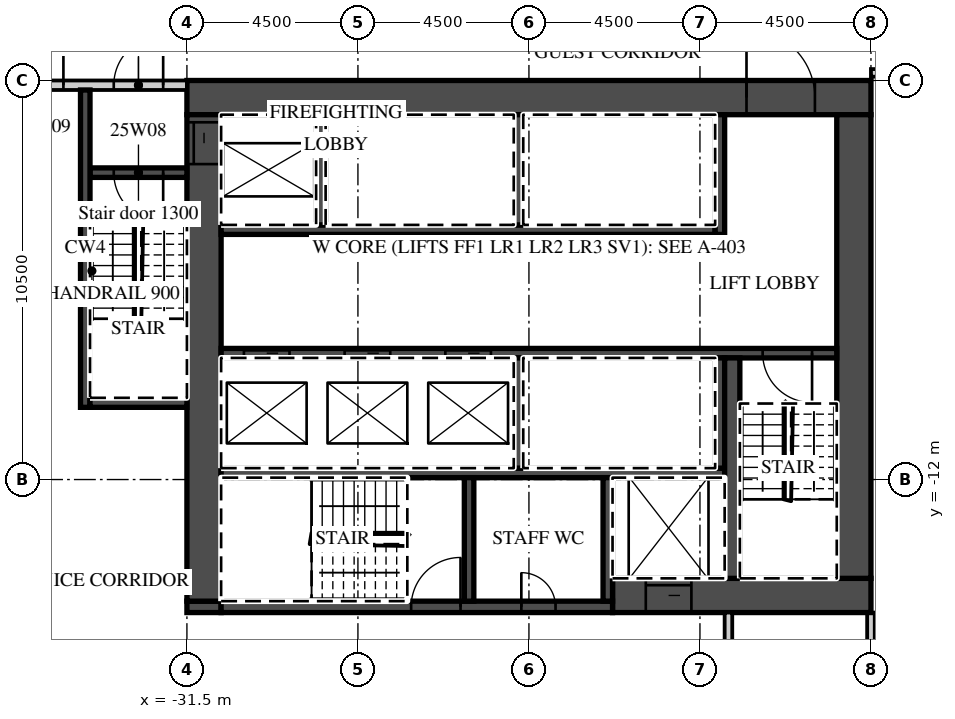
"""IFC4 building model, lengths in metres.
Left out: names, types, materials, properties, quantities, classifications, styles, units other than length and angle.
Written with IfcOpenShell. Run it as: python <this file> out.ifc"""

import sys

from ifc_helpers import new_model, si_unit, direction, frame, frame_2d, origin, place, context, subcontext, project, spatial, rectangle, extrude, element, fill, save


model = new_model("IFC4")
c1 = context("Model", 3, precision=1e-05, world=origin(), true_north=direction((0.0, 1.0)))
c2 = subcontext(c1, "Body", "Model", "MODEL_VIEW")
j1 = project(units=[si_unit("LENGTHUNIT", "METRE"), si_unit("PLANEANGLEUNIT", "RADIAN")], contexts=[c1])
p1 = place(None, origin())
s1 = spatial("IfcSite", under=j1, at=p1, CompositionType="ELEMENT")
p2 = place(p1, origin())
s2 = spatial("IfcBuilding", under=s1, at=p2, CompositionType="ELEMENT")
p3 = place(p2, frame((0.0, 0.0, 117.4)))
s3 = spatial("IfcBuildingStorey", under=s2, at=p3, CompositionType="ELEMENT", Elevation=117.4)
p4 = place(p3, frame((-13.5, -22.232, 0.0), z_axis=(0.0, 0.0, 1.0), x_axis=(0.0, 1.0, 0.0)))
e1 = element("IfcWall", 1, at=p4, inside=s3, PredefinedType="PARTITIONING", context=c2, shape_type="SweptSolid", body=[
    extrude(rectangle(XDim=6.732, YDim=0.2, at=frame_2d((3.366, 0.0))), origin(), (0.0, 0.0, 1.0), 3.02),
])
p5 = place(p3, frame((-13.5, -1.3, 0.0), z_axis=(0.0, 0.0, 1.0), x_axis=(1.0, 0.0, 0.0)))
e2 = element("IfcWall", 2, at=p5, inside=s3, PredefinedType="PARTITIONING", context=c2, shape_type="SweptSolid", body=[
    extrude(rectangle(XDim=60.932, YDim=0.2, at=frame_2d((30.466, 0.0))), origin(), (0.0, 0.0, 1.0), 3.02),
])
p6 = place(p5, frame((0.575, 0.0, 0.0)))
e3 = element("IfcOpeningElement", 3, at=p6, cuts=e2, PredefinedType="OPENING", context=c2, shape_type="SweptSolid", body=[
    extrude(rectangle(XDim=1.0, YDim=2.1, at=frame_2d((0.5, 1.05))), frame((0.0, 0.11, 0.0), z_axis=(0.0, -1.0, 0.0), x_axis=(1.0, 0.0, 0.0)), (0.0, 0.0, 1.0), 0.22),
])
p7 = place(p5, frame((5.075, 0.0, 0.0)))
e4 = element("IfcOpeningElement", 4, at=p7, cuts=e2, PredefinedType="OPENING", context=c2, shape_type="SweptSolid", body=[
    extrude(rectangle(XDim=1.0, YDim=2.1, at=frame_2d((0.5, 1.05))), frame((0.0, 0.11, 0.0), z_axis=(0.0, -1.0, 0.0), x_axis=(1.0, 0.0, 0.0)), (0.0, 0.0, 1.0), 0.22),
])
p8 = place(p5, frame((11.925, 0.0, 0.0)))
e5 = element("IfcOpeningElement", 5, at=p8, cuts=e2, PredefinedType="OPENING", context=c2, shape_type="SweptSolid", body=[
    extrude(rectangle(XDim=1.0, YDim=2.1, at=frame_2d((0.5, 1.05))), frame((0.0, 0.11, 0.0), z_axis=(0.0, -1.0, 0.0), x_axis=(1.0, 0.0, 0.0)), (0.0, 0.0, 1.0), 0.22),
])
p9 = place(p5, frame((15.938, 0.0, 0.0)))
e6 = element("IfcOpeningElement", 6, at=p9, cuts=e2, PredefinedType="OPENING", context=c2, shape_type="SweptSolid", body=[
    extrude(rectangle(XDim=1.2, YDim=2.1, at=frame_2d((0.6, 1.05))), frame((0.0, 0.11, 0.0), z_axis=(0.0, -1.0, 0.0), x_axis=(1.0, 0.0, 0.0)), (0.0, 0.0, 1.0), 0.22),
])
p10 = place(p5, frame((25.45, 0.0, 0.0)))
e7 = element("IfcOpeningElement", 7, at=p10, cuts=e2, PredefinedType="OPENING", context=c2, shape_type="SweptSolid", body=[
    extrude(rectangle(XDim=1.0, YDim=2.1, at=frame_2d((0.5, 1.05))), frame((0.0, 0.11, 0.0), z_axis=(0.0, -1.0, 0.0), x_axis=(1.0, 0.0, 0.0)), (0.0, 0.0, 1.0), 0.22),
])
p11 = place(p5, frame((27.55, 0.0, 0.0)))
e8 = element("IfcOpeningElement", 8, at=p11, cuts=e2, PredefinedType="OPENING", context=c2, shape_type="SweptSolid", body=[
    extrude(rectangle(XDim=1.0, YDim=2.1, at=frame_2d((0.5, 1.05))), frame((0.0, 0.11, 0.0), z_axis=(0.0, -1.0, 0.0), x_axis=(1.0, 0.0, 0.0)), (0.0, 0.0, 1.0), 0.22),
])
p12 = place(p5, frame((33.938, 0.0, 0.0)))
e9 = element("IfcOpeningElement", 9, at=p12, cuts=e2, PredefinedType="OPENING", context=c2, shape_type="SweptSolid", body=[
    extrude(rectangle(XDim=1.2, YDim=2.1, at=frame_2d((0.6, 1.05))), frame((0.0, 0.11, 0.0), z_axis=(0.0, -1.0, 0.0), x_axis=(1.0, 0.0, 0.0)), (0.0, 0.0, 1.0), 0.22),
])
p13 = place(p5, frame((45.862, 0.0, 0.0)))
e10 = element("IfcOpeningElement", 10, at=p13, cuts=e2, PredefinedType="OPENING", context=c2, shape_type="SweptSolid", body=[
    extrude(rectangle(XDim=1.2, YDim=2.1, at=frame_2d((0.6, 1.05))), frame((0.0, 0.11, 0.0), z_axis=(0.0, -1.0, 0.0), x_axis=(1.0, 0.0, 0.0)), (0.0, 0.0, 1.0), 0.22),
])
p14 = place(p5, frame((52.425, 0.0, 0.0)))
e11 = element("IfcOpeningElement", 11, at=p14, cuts=e2, PredefinedType="OPENING", context=c2, shape_type="SweptSolid", body=[
    extrude(rectangle(XDim=1.0, YDim=2.1, at=frame_2d((0.5, 1.05))), frame((0.0, 0.11, 0.0), z_axis=(0.0, -1.0, 0.0), x_axis=(1.0, 0.0, 0.0)), (0.0, 0.0, 1.0), 0.22),
])
p15 = place(p5, frame((56.95, 0.0, 0.0)))
e12 = element("IfcOpeningElement", 12, at=p15, cuts=e2, PredefinedType="OPENING", context=c2, shape_type="SweptSolid", body=[
    extrude(rectangle(XDim=1.0, YDim=2.1, at=frame_2d((0.5, 1.05))), frame((0.0, 0.11, 0.0), z_axis=(0.0, -1.0, 0.0), x_axis=(1.0, 0.0, 0.0)), (0.0, 0.0, 1.0), 0.22),
])
p16 = place(p5, frame((59.882, 0.0, 0.0)))
e13 = element("IfcOpeningElement", 13, at=p16, cuts=e2, PredefinedType="OPENING", context=c2, shape_type="SweptSolid", body=[
    extrude(rectangle(XDim=0.9, YDim=2.1, at=frame_2d((0.45, 1.05))), frame((0.0, 0.11, 0.0), z_axis=(0.0, -1.0, 0.0), x_axis=(1.0, 0.0, 0.0)), (0.0, 0.0, 1.0), 0.22),
])
p17 = place(p3, frame((-31.5, -1.95, 0.0), z_axis=(0.0, 0.0, 1.0), x_axis=(1.0, 0.0, 0.0)))
e14 = element("IfcWall", 14, at=p17, inside=s3, PredefinedType="SHEAR", context=c2, shape_type="SweptSolid", body=[
    extrude(rectangle(XDim=18.0, YDim=0.9, at=frame_2d((9.0, 0.0))), origin(), (0.0, 0.0, 1.0), 3.02),
])
p18 = place(p17, frame((14.725, 0.0, 0.0)))
e15 = element("IfcOpeningElement", 15, at=p18, cuts=e14, PredefinedType="OPENING", context=c2, shape_type="SweptSolid", body=[
    extrude(rectangle(XDim=1.8, YDim=2.1, at=frame_2d((0.9, 1.05))), frame((0.0, 0.46, 0.0), z_axis=(0.0, -1.0, 0.0), x_axis=(1.0, 0.0, 0.0)), (0.0, 0.0, 1.0), 0.92),
])
p19 = place(p3, frame((-20.3, -15.05, 0.0), z_axis=(0.0, 0.0, 1.0), x_axis=(1.0, 0.0, 0.0)))
e16 = element("IfcWall", 16, at=p19, inside=s3, PredefinedType="SHEAR", context=c2, shape_type="SweptSolid", body=[
    extrude(rectangle(XDim=6.8, YDim=0.9, at=frame_2d((3.4, 0.0))), origin(), (0.0, 0.0, 1.0), 3.02),
])
p20 = place(p19, frame((0.875, 0.0, 0.0)))
e17 = element("IfcOpeningElement", 17, at=p20, cuts=e16, PredefinedType="OPENING", context=c2, shape_type="SweptSolid", body=[
    extrude(rectangle(XDim=1.2, YDim=2.1, at=frame_2d((0.6, 1.05))), frame((0.0, 0.46, 0.0), z_axis=(0.0, -1.0, 0.0), x_axis=(1.0, 0.0, 0.0)), (0.0, 0.0, 1.0), 0.92),
])
p21 = place(p3, frame((-31.5, -15.35, 0.0), z_axis=(0.0, 0.0, 1.0), x_axis=(1.0, 0.0, 0.0)))
e18 = element("IfcWall", 18, at=p21, inside=s3, PredefinedType="SHEAR", context=c2, shape_type="SweptSolid", body=[
    extrude(rectangle(XDim=0.9, YDim=0.3, at=frame_2d((0.45, 0.0))), origin(), (0.0, 0.0, 1.0), 3.02),
])
p22 = place(p3, frame((-30.6, -15.35, 0.0), z_axis=(0.0, 0.0, 1.0), x_axis=(1.0, 0.0, 0.0)))
e19 = element("IfcWall", 19, at=p22, inside=s3, PredefinedType="SHEAR", context=c2, shape_type="SweptSolid", body=[
    extrude(rectangle(XDim=10.3, YDim=0.3, at=frame_2d((5.15, 0.0))), origin(), (0.0, 0.0, 1.0), 3.02),
])
p23 = place(p22, frame((5.0, 0.0, 0.0)))
e20 = element("IfcOpeningElement", 20, at=p23, cuts=e19, PredefinedType="OPENING", context=c2, shape_type="SweptSolid", body=[
    extrude(rectangle(XDim=1.3, YDim=2.1, at=frame_2d((0.65, 1.05))), frame((0.0, 0.16, 0.0), z_axis=(0.0, -1.0, 0.0), x_axis=(1.0, 0.0, 0.0)), (0.0, 0.0, 1.0), 0.32),
])
p24 = place(p22, frame((7.9, 0.0, 0.0)))
e21 = element("IfcOpeningElement", 21, at=p24, cuts=e19, PredefinedType="OPENING", context=c2, shape_type="SweptSolid", body=[
    extrude(rectangle(XDim=0.9, YDim=2.1, at=frame_2d((0.45, 1.05))), frame((0.0, 0.16, 0.0), z_axis=(0.0, -1.0, 0.0), x_axis=(1.0, 0.0, 0.0)), (0.0, 0.0, 1.0), 0.32),
])
p25 = place(p3, frame((-31.05, -15.2, 0.0), z_axis=(0.0, 0.0, 1.0), x_axis=(0.0, 1.0, 0.0)))
e22 = element("IfcWall", 22, at=p25, inside=s3, PredefinedType="SHEAR", context=c2, shape_type="SweptSolid", body=[
    extrude(rectangle(XDim=12.8, YDim=0.9, at=frame_2d((6.4, 0.0))), origin(), (0.0, 0.0, 1.0), 3.02),
])
p26 = place(p25, frame((11.5, 0.0, 0.0)))
e23 = element("IfcOpeningElement", 23, at=p26, cuts=e22, PredefinedType="OPENING", context=c2, shape_type="SweptSolid", body=[
    extrude(rectangle(XDim=1.1, YDim=2.1, at=frame_2d((0.55, 1.05))), frame((0.0, 0.46, 0.0), z_axis=(0.0, -1.0, 0.0), x_axis=(1.0, 0.0, 0.0)), (0.0, 0.0, 1.0), 0.92),
])
p27 = place(p3, frame((-13.95, -14.6, 0.0), z_axis=(0.0, 0.0, 1.0), x_axis=(0.0, 1.0, 0.0)))
e24 = element("IfcWall", 24, at=p27, inside=s3, PredefinedType="SHEAR", context=c2, shape_type="SweptSolid", body=[
    extrude(rectangle(XDim=12.2, YDim=0.9, at=frame_2d((6.1, 0.0))), origin(), (0.0, 0.0, 1.0), 3.02),
])
p28 = place(p3, frame((-30.6, -5.425, 0.0), z_axis=(0.0, 0.0, 1.0), x_axis=(1.0, 0.0, 0.0)))
e25 = element("IfcWall", 25, at=p28, inside=s3, PredefinedType="SHEAR", context=c2, shape_type="SweptSolid", body=[
    extrude(rectangle(XDim=13.0, YDim=0.25, at=frame_2d((6.5, 0.0))), origin(), (0.0, 0.0, 1.0), 3.02),
])
p29 = place(p3, frame((-17.475, -5.55, 0.0), z_axis=(0.0, 0.0, 1.0), x_axis=(0.0, 1.0, 0.0)))
e26 = element("IfcWall", 26, at=p29, inside=s3, PredefinedType="SHEAR", context=c2, shape_type="SweptSolid", body=[
    extrude(rectangle(XDim=3.15, YDim=0.25, at=frame_2d((1.575, 0.0))), origin(), (0.0, 0.0, 1.0), 3.02),
])
for number, where, z_axis, x_axis in (
    (27, (-27.975, -5.3, 0.0), (0.0, 0.0, 1.0), (0.0, 1.0, 0.0)),
    (28, (-22.775, -5.3, 0.0), (0.0, 0.0, 1.0), (0.0, 1.0, 0.0)),
):
    element("IfcWall", number, at=place(p3, frame(where, z_axis=z_axis, x_axis=x_axis)), inside=s3, PredefinedType="SHEAR", context=c2, shape_type="SweptSolid", body=[
        extrude(rectangle(XDim=2.9, YDim=0.25, at=frame_2d((1.45, 0.0))), origin(), (0.0, 0.0, 1.0), 3.02),
    ])
p30 = place(p3, frame((-30.6, -8.675, 0.0), z_axis=(0.0, 0.0, 1.0), x_axis=(1.0, 0.0, 0.0)))
e29 = element("IfcWall", 29, at=p30, inside=s3, PredefinedType="SHEAR", context=c2, shape_type="SweptSolid", body=[
    extrude(rectangle(XDim=16.2, YDim=0.25, at=frame_2d((8.1, 0.0))), origin(), (0.0, 0.0, 1.0), 3.02),
])
p31 = place(p30, frame((0.6, 0.0, 0.0)))
e30 = element("IfcOpeningElement", 30, at=p31, cuts=e29, PredefinedType="OPENING", context=c2, shape_type="SweptSolid", body=[
    extrude(rectangle(XDim=1.2, YDim=2.1, at=frame_2d((0.6, 1.05))), frame((0.0, 0.135, 0.0), z_axis=(0.0, -1.0, 0.0), x_axis=(1.0, 0.0, 0.0)), (0.0, 0.0, 1.0), 0.27),
])
p32 = place(p30, frame((3.25, 0.0, 0.0)))
e31 = element("IfcOpeningElement", 31, at=p32, cuts=e29, PredefinedType="OPENING", context=c2, shape_type="SweptSolid", body=[
    extrude(rectangle(XDim=1.2, YDim=2.1, at=frame_2d((0.6, 1.05))), frame((0.0, 0.135, 0.0), z_axis=(0.0, -1.0, 0.0), x_axis=(1.0, 0.0, 0.0)), (0.0, 0.0, 1.0), 0.27),
])
p33 = place(p30, frame((5.9, 0.0, 0.0)))
e32 = element("IfcOpeningElement", 32, at=p33, cuts=e29, PredefinedType="OPENING", context=c2, shape_type="SweptSolid", body=[
    extrude(rectangle(XDim=1.2, YDim=2.1, at=frame_2d((0.6, 1.05))), frame((0.0, 0.135, 0.0), z_axis=(0.0, -1.0, 0.0), x_axis=(1.0, 0.0, 0.0)), (0.0, 0.0, 1.0), 0.27),
])
p34 = place(p30, frame((14.25, 0.0, 0.0)))
e33 = element("IfcOpeningElement", 33, at=p34, cuts=e29, PredefinedType="OPENING", context=c2, shape_type="SweptSolid", body=[
    extrude(rectangle(XDim=1.3, YDim=2.1, at=frame_2d((0.65, 1.05))), frame((0.0, 0.135, 0.0), z_axis=(0.0, -1.0, 0.0), x_axis=(1.0, 0.0, 0.0)), (0.0, 0.0, 1.0), 0.27),
])
p35 = place(p3, frame((-30.6, -11.825, 0.0), z_axis=(0.0, 0.0, 1.0), x_axis=(1.0, 0.0, 0.0)))
e34 = element("IfcWall", 34, at=p35, inside=s3, PredefinedType="SHEAR", context=c2, shape_type="SweptSolid", body=[
    extrude(rectangle(XDim=13.25, YDim=0.25, at=frame_2d((6.625, 0.0))), origin(), (0.0, 0.0, 1.0), 3.02),
])
for number, where, z_axis, x_axis in (
    (35, (-17.475, -11.7, 0.0), (0.0, 0.0, 1.0), (0.0, 1.0, 0.0)),
    (36, (-22.775, -11.7, 0.0), (0.0, 0.0, 1.0), (0.0, 1.0, 0.0)),
):
    element("IfcWall", number, at=place(p3, frame(where, z_axis=z_axis, x_axis=x_axis)), inside=s3, PredefinedType="SHEAR", context=c2, shape_type="SweptSolid", body=[
        extrude(rectangle(XDim=2.9, YDim=0.25, at=frame_2d((1.45, 0.0))), origin(), (0.0, 0.0, 1.0), 3.02),
    ])
p36 = place(p3, frame((-17.15, -14.6, 0.0), z_axis=(0.0, 0.0, 1.0), x_axis=(0.0, 1.0, 0.0)))
e37 = element("IfcWall", 37, at=p36, inside=s3, PredefinedType="SHEAR", context=c2, shape_type="SweptSolid", body=[
    extrude(rectangle(XDim=5.8, YDim=0.4, at=frame_2d((2.9, 0.0))), origin(), (0.0, 0.0, 1.0), 3.02),
])
for number, where, z_axis, x_axis in (
    (38, (-20.425, -15.2, 0.0), (0.0, 0.0, 1.0), (0.0, 1.0, 0.0)),
    (39, (-24.075, -15.2, 0.0), (0.0, 0.0, 1.0), (0.0, 1.0, 0.0)),
):
    element("IfcWall", number, at=place(p3, frame(where, z_axis=z_axis, x_axis=x_axis)), inside=s3, PredefinedType="SHEAR", context=c2, shape_type="SweptSolid", body=[
        extrude(rectangle(XDim=3.25, YDim=0.25, at=frame_2d((1.625, 0.0))), origin(), (0.0, 0.0, 1.0), 3.02),
    ])
p37 = place(p3, frame((-39.035, -1.625, 0.0), z_axis=(0.0, 0.0, 1.0), x_axis=(1.0, 0.0, 0.0)))
e40 = element("IfcWall", 40, at=p37, inside=s3, PredefinedType="PARTITIONING", context=c2, shape_type="SweptSolid", body=[
    extrude(rectangle(XDim=7.535, YDim=0.25, at=frame_2d((3.768, 0.0))), origin(), (0.0, 0.0, 1.0), 3.02),
])
p38 = place(p37, frame((5.61, 0.0, 0.0)))
e41 = element("IfcOpeningElement", 41, at=p38, cuts=e40, PredefinedType="OPENING", context=c2, shape_type="SweptSolid", body=[
    extrude(rectangle(XDim=1.3, YDim=2.1, at=frame_2d((0.65, 1.05))), frame((0.0, 0.135, 0.0), z_axis=(0.0, -1.0, 0.0), x_axis=(1.0, 0.0, 0.0)), (0.0, 0.0, 1.0), 0.27),
])
p39 = place(p37, frame((3.185, 0.0, 0.0)))
e42 = element("IfcOpeningElement", 42, at=p39, cuts=e40, PredefinedType="OPENING", context=c2, shape_type="SweptSolid", body=[
    extrude(rectangle(XDim=1.1, YDim=2.1, at=frame_2d((0.55, 1.05))), frame((0.0, 0.135, 0.0), z_axis=(0.0, -1.0, 0.0), x_axis=(1.0, 0.0, 0.0)), (0.0, 0.0, 1.0), 0.27),
])
p40 = place(p3, frame((-34.05, -3.925, 0.0), z_axis=(0.0, 0.0, 1.0), x_axis=(1.0, 0.0, 0.0)))
e43 = element("IfcWall", 43, at=p40, inside=s3, PredefinedType="SHEAR", context=c2, shape_type="SweptSolid", body=[
    extrude(rectangle(XDim=2.55, YDim=0.25, at=frame_2d((1.275, 0.0))), origin(), (0.0, 0.0, 1.0), 3.02),
])
p41 = place(p40, frame((0.625, 0.0, 0.0)))
e44 = element("IfcOpeningElement", 44, at=p41, cuts=e43, PredefinedType="OPENING", context=c2, shape_type="SweptSolid", body=[
    extrude(rectangle(XDim=1.3, YDim=2.1, at=frame_2d((0.65, 1.05))), frame((0.0, 0.135, 0.0), z_axis=(0.0, -1.0, 0.0), x_axis=(1.0, 0.0, 0.0)), (0.0, 0.0, 1.0), 0.27),
])
p42 = place(p3, frame((-34.175, -10.1, 0.0), z_axis=(0.0, 0.0, 1.0), x_axis=(0.0, 1.0, 0.0)))
e45 = element("IfcWall", 45, at=p42, inside=s3, PredefinedType="SHEAR", context=c2, shape_type="SweptSolid", body=[
    extrude(rectangle(XDim=8.35, YDim=0.25, at=frame_2d((4.175, 0.0))), origin(), (0.0, 0.0, 1.0), 3.02),
])
p43 = place(p3, frame((-34.05, -9.975, 0.0), z_axis=(0.0, 0.0, 1.0), x_axis=(1.0, 0.0, 0.0)))
e46 = element("IfcWall", 46, at=p43, inside=s3, PredefinedType="SHEAR", context=c2, shape_type="SweptSolid", body=[
    extrude(rectangle(XDim=2.55, YDim=0.25, at=frame_2d((1.275, 0.0))), origin(), (0.0, 0.0, 1.0), 3.02),
])
p44 = place(p3, frame((-17.25, -17.7, 0.0), z_axis=(0.0, 0.0, 1.0), x_axis=(0.0, 1.0, 0.0)))
e47 = element("IfcWall", 47, at=p44, inside=s3, PredefinedType="PARTITIONING", context=c2, shape_type="SweptSolid", body=[
    extrude(rectangle(XDim=2.2, YDim=0.2, at=frame_2d((1.1, 0.0))), origin(), (0.0, 0.0, 1.0), 3.02),
])
p45 = place(p31, origin())
e48 = element("IfcDoor", 48, at=p45, inside=s3, OperationType="SLIDING_TO_LEFT", PredefinedType="DOOR", context=c2, shape_type="SweptSolid", body=[
    extrude(rectangle(XDim=1.2, YDim=2.1, at=frame_2d((0.6, 1.05))), frame((0.0, 0.025, 0.0), z_axis=(0.0, -1.0, 0.0), x_axis=(1.0, 0.0, 0.0)), (0.0, 0.0, 1.0), 0.05),
])
fill(e30, e48)
p46 = place(p32, origin())
e49 = element("IfcDoor", 49, at=p46, inside=s3, OperationType="SLIDING_TO_RIGHT", PredefinedType="DOOR", context=c2, shape_type="SweptSolid", body=[
    extrude(rectangle(XDim=1.2, YDim=2.1, at=frame_2d((0.6, 1.05))), frame((0.0, 0.025, 0.0), z_axis=(0.0, -1.0, 0.0), x_axis=(1.0, 0.0, 0.0)), (0.0, 0.0, 1.0), 0.05),
])
fill(e31, e49)
p47 = place(p33, origin())
e50 = element("IfcDoor", 50, at=p47, inside=s3, OperationType="SLIDING_TO_RIGHT", PredefinedType="DOOR", context=c2, shape_type="SweptSolid", body=[
    extrude(rectangle(XDim=1.2, YDim=2.1, at=frame_2d((0.6, 1.05))), frame((0.0, 0.025, 0.0), z_axis=(0.0, -1.0, 0.0), x_axis=(1.0, 0.0, 0.0)), (0.0, 0.0, 1.0), 0.05),
])
fill(e32, e50)
p48 = place(p20, origin())
e51 = element("IfcDoor", 51, at=p48, inside=s3, OperationType="SLIDING_TO_LEFT", PredefinedType="DOOR", context=c2, shape_type="SweptSolid", body=[
    extrude(rectangle(XDim=1.2, YDim=2.1, at=frame_2d((0.6, 1.05))), frame((0.0, 0.025, 0.0), z_axis=(0.0, -1.0, 0.0), x_axis=(1.0, 0.0, 0.0)), (0.0, 0.0, 1.0), 0.05),
])
fill(e17, e51)
p49 = place(p26, origin())
e52 = element("IfcDoor", 52, at=p49, inside=s3, OperationType="SLIDING_TO_RIGHT", PredefinedType="DOOR", context=c2, shape_type="SweptSolid", body=[
    extrude(rectangle(XDim=1.1, YDim=2.1, at=frame_2d((0.55, 1.05))), frame((0.0, 0.025, 0.0), z_axis=(0.0, -1.0, 0.0), x_axis=(1.0, 0.0, 0.0)), (0.0, 0.0, 1.0), 0.05),
])
fill(e23, e52)
p50 = place(p18, origin())
e53 = element("IfcDoor", 53, at=p50, inside=s3, OperationType="DOUBLE_DOOR_DOUBLE_SWING", PredefinedType="DOOR", context=c2, shape_type="SweptSolid", body=[
    extrude(rectangle(XDim=1.8, YDim=2.1, at=frame_2d((0.9, 1.05))), frame((0.0, 0.025, 0.0), z_axis=(0.0, -1.0, 0.0), x_axis=(1.0, 0.0, 0.0)), (0.0, 0.0, 1.0), 0.05),
])
fill(e15, e53)
p51 = place(p38, origin())
e54 = element("IfcDoor", 54, at=p51, inside=s3, OperationType="SINGLE_SWING_RIGHT", PredefinedType="DOOR", context=c2, shape_type="SweptSolid", body=[
    extrude(rectangle(XDim=1.3, YDim=2.1, at=frame_2d((0.65, 1.05))), frame((0.0, 0.025, 0.0), z_axis=(0.0, -1.0, 0.0), x_axis=(1.0, 0.0, 0.0)), (0.0, 0.0, 1.0), 0.05),
])
fill(e41, e54)
p52 = place(p41, origin())
e55 = element("IfcDoor", 55, at=p52, inside=s3, OperationType="SINGLE_SWING_RIGHT", PredefinedType="DOOR", context=c2, shape_type="SweptSolid", body=[
    extrude(rectangle(XDim=1.3, YDim=2.1, at=frame_2d((0.65, 1.05))), frame((0.0, 0.025, 0.0), z_axis=(0.0, -1.0, 0.0), x_axis=(1.0, 0.0, 0.0)), (0.0, 0.0, 1.0), 0.05),
])
fill(e44, e55)
p53 = place(p39, origin())
e56 = element("IfcDoor", 56, at=p53, inside=s3, OperationType="SINGLE_SWING_RIGHT", PredefinedType="DOOR", context=c2, shape_type="SweptSolid", body=[
    extrude(rectangle(XDim=1.1, YDim=2.1, at=frame_2d((0.55, 1.05))), frame((0.0, 0.025, 0.0), z_axis=(0.0, -1.0, 0.0), x_axis=(1.0, 0.0, 0.0)), (0.0, 0.0, 1.0), 0.05),
])
fill(e42, e56)
p54 = place(p34, origin())
e57 = element("IfcDoor", 57, at=p54, inside=s3, OperationType="SINGLE_SWING_RIGHT", PredefinedType="DOOR", context=c2, shape_type="SweptSolid", body=[
    extrude(rectangle(XDim=1.3, YDim=2.1, at=frame_2d((0.65, 1.05))), frame((0.0, 0.025, 0.0), z_axis=(0.0, -1.0, 0.0), x_axis=(1.0, 0.0, 0.0)), (0.0, 0.0, 1.0), 0.05),
])
fill(e33, e57)
p55 = place(p23, origin())
e58 = element("IfcDoor", 58, at=p55, inside=s3, OperationType="SINGLE_SWING_RIGHT", PredefinedType="DOOR", context=c2, shape_type="SweptSolid", body=[
    extrude(rectangle(XDim=1.3, YDim=2.1, at=frame_2d((0.65, 1.05))), frame((0.0, 0.025, 0.0), z_axis=(0.0, -1.0, 0.0), x_axis=(1.0, 0.0, 0.0)), (0.0, 0.0, 1.0), 0.05),
])
fill(e20, e58)
p56 = place(p24, origin())
e59 = element("IfcDoor", 59, at=p56, inside=s3, OperationType="SINGLE_SWING_LEFT", PredefinedType="DOOR", context=c2, shape_type="SweptSolid", body=[
    extrude(rectangle(XDim=0.9, YDim=2.1, at=frame_2d((0.45, 1.05))), frame((0.0, 0.025, 0.0), z_axis=(0.0, -1.0, 0.0), x_axis=(1.0, 0.0, 0.0)), (0.0, 0.0, 1.0), 0.05),
])
fill(e21, e59)
save(model, sys.argv[1])
